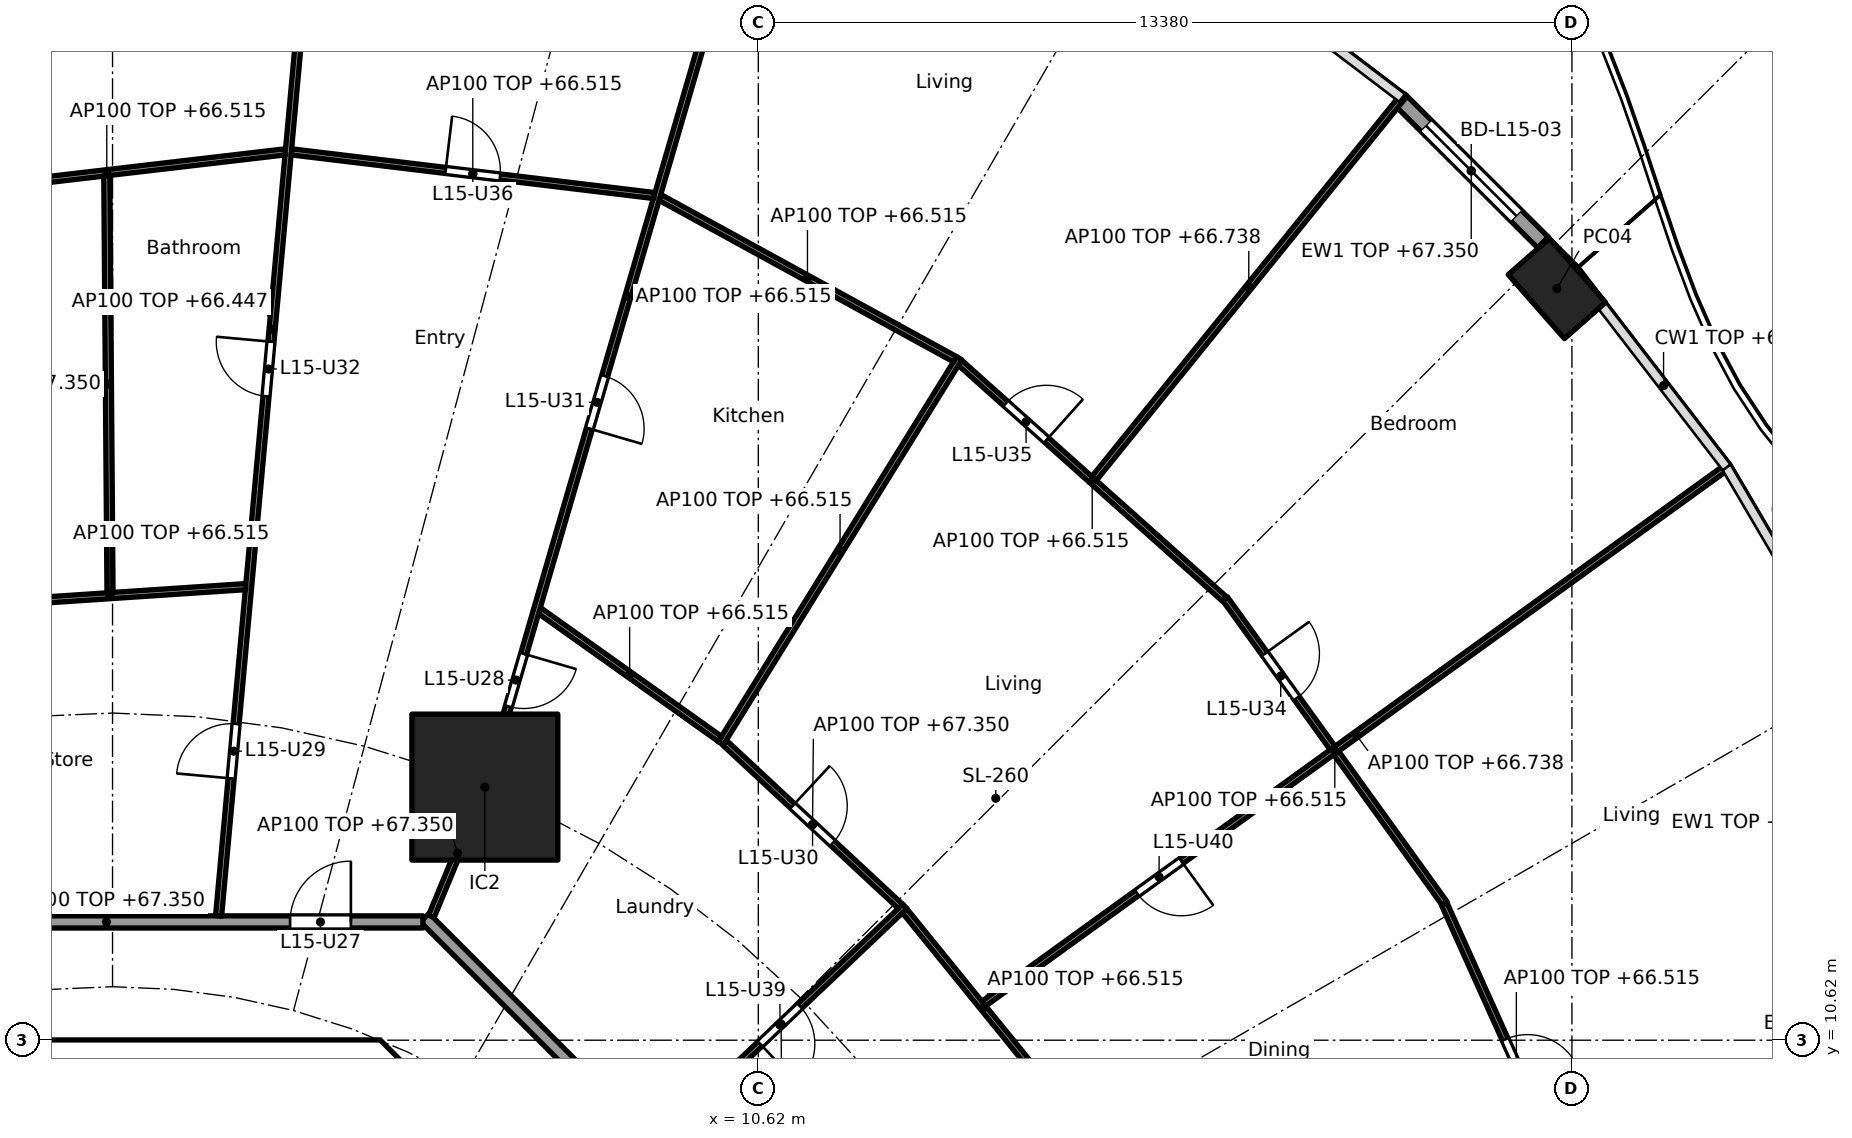
"""IFC4 building model, lengths in metres.
Left out: names, types, materials, properties, quantities, classifications, styles, units other than length and angle.
Written with IfcOpenShell. Run it as: python <this file> out.ifc"""

import sys

from ifc_helpers import new_model, si_unit, direction, frame, frame_2d, origin, origin_2d, place, context, subcontext, project, spatial, polyline, rectangle, hollow_rectangle, outline, extrude, element, fill, save


model = new_model("IFC4")
c1 = context("Model", 3, precision=1e-05, world=origin(), true_north=direction((0.0, 1.0)))
c2 = subcontext(c1, "Body", "Model", "MODEL_VIEW")
j1 = project(units=[si_unit("LENGTHUNIT", "METRE"), si_unit("PLANEANGLEUNIT", "RADIAN")], contexts=[c1])
p1 = place(None, origin())
s1 = spatial("IfcSite", under=j1, at=p1, CompositionType="ELEMENT")
p2 = place(p1, origin())
s2 = spatial("IfcBuilding", under=s1, at=p2, CompositionType="ELEMENT")
p3 = place(p2, frame((0.0, 0.0, 64.0)))
s3 = spatial("IfcBuildingStorey", under=s2, at=p3, CompositionType="ELEMENT", Elevation=64.0)
p4 = place(p3, frame((23.752, 22.981, 0.0), z_axis=(0.0, 0.0, 1.0), x_axis=(-0.660114607735, 0.751164898445, 0.0)))
e1 = element("IfcColumn", 1, at=p4, inside=s3, PredefinedType="COLUMN", context=c2, shape_type="SweptSolid", body=[
    extrude(hollow_rectangle(XDim=1.4, YDim=0.9, WallThickness=0.05, at=origin_2d()), origin(), (0.0, 0.0, 1.0), 3.7),
])
p5 = place(p3, frame((6.123, 14.782, 0.0), z_axis=(0.0, 0.0, 1.0), x_axis=(1.0, 0.0, 0.0)))
e2 = element("IfcColumn", 2, at=p5, inside=s3, PredefinedType="COLUMN", context=c2, shape_type="SweptSolid", body=[
    extrude(rectangle(XDim=2.4, YDim=2.4, at=origin_2d()), origin(), (0.0, 0.0, 1.0), 3.7),
])
p6 = place(p3, frame((21.166, 26.092, 0.0), z_axis=(0.0, 0.0, 1.0), x_axis=(0.707803094595, -0.706409781417, 0.0)))
e3 = element("IfcWall", 3, at=p6, inside=s3, PredefinedType="SOLIDWALL", context=c2, shape_type="SweptSolid", body=[
    extrude(rectangle(XDim=3.329, YDim=0.25, at=frame_2d((1.665, 0.0))), origin(), (0.0, 0.0, 1.0), 3.35),
])
p7 = place(p6, frame((0.615, 0.0, 0.0)))
e4 = element("IfcOpeningElement", 4, at=p7, cuts=e3, PredefinedType="OPENING", context=c2, shape_type="SweptSolid", body=[
    extrude(rectangle(XDim=2.1, YDim=2.4, at=frame_2d((1.05, 1.2))), frame((0.0, 0.135, 0.0), z_axis=(0.0, -1.0, 0.0), x_axis=(1.0, 0.0, 0.0)), (0.0, 0.0, 1.0), 0.27),
])
p8 = place(p3, origin())
e5 = element("IfcWall", 5, at=p8, inside=s3, PredefinedType="SHEAR", context=c2, shape_type="SweptSolid", body=[
    extrude(outline(polyline([(-4.152, 10.025), (-4.401, 9.776), (-4.825, 10.2), (-4.401, 10.625), (4.401, 10.625), (4.825, 10.2), (4.401, 9.776), (4.152, 10.025), (-4.152, 10.025)])), origin(), (0.0, 0.0, 1.0), 3.35),
])
p9 = place(p3, frame((12.635, 5.134, 0.0), z_axis=(0.0, 0.0, 1.0), x_axis=(-0.707106781187, 0.707106781187, 0.0)))
e6 = element("IfcWall", 6, at=p9, inside=s3, PredefinedType="PARTITIONING", context=c2, shape_type="SweptSolid", body=[
    extrude(rectangle(XDim=10.609, YDim=0.2, at=frame_2d((5.305, 0.0))), origin(), (0.0, 0.0, 1.0), 3.35),
])
p10 = place(p3, frame((5.104, 12.565, 0.0), z_axis=(0.0, 0.0, 1.0), x_axis=(-1.0, 0.0, 0.0)))
e7 = element("IfcWall", 7, at=p10, inside=s3, PredefinedType="PARTITIONING", context=c2, shape_type="SweptSolid", body=[
    extrude(rectangle(XDim=10.409, YDim=0.2, at=frame_2d((5.205, 0.0))), origin(), (0.0, 0.0, 1.0), 3.35),
])
p11 = place(p10, frame((1.185, 0.0, 0.0)))
e8 = element("IfcOpeningElement", 8, at=p11, cuts=e7, PredefinedType="OPENING", context=c2, shape_type="SweptSolid", body=[
    extrude(rectangle(XDim=1.0, YDim=2.1, at=frame_2d((0.5, 1.05))), frame((0.0, 0.11, 0.0), z_axis=(0.0, -1.0, 0.0), x_axis=(1.0, 0.0, 0.0)), (0.0, 0.0, 1.0), 0.22),
])
p12 = place(p3, frame((24.273, 7.584, 0.0), z_axis=(0.0, 0.0, 1.0), x_axis=(-0.410201529109, 0.911994904326, 0.0)))
e9 = element("IfcWall", 9, at=p12, inside=s3, PredefinedType="PARTITIONING", context=c2, shape_type="SweptSolid", body=[
    extrude(rectangle(XDim=5.787, YDim=0.1, at=frame_2d((2.894, 0.0))), origin(), (0.0, 0.0, 1.0), 2.515),
])
p13 = place(p12, frame((2.444, 0.0, 0.0)))
e10 = element("IfcOpeningElement", 10, at=p13, cuts=e9, PredefinedType="OPENING", context=c2, shape_type="SweptSolid", body=[
    extrude(rectangle(XDim=0.9, YDim=2.1, at=frame_2d((0.45, 1.05))), frame((0.0, 0.06, 0.0), z_axis=(0.0, -1.0, 0.0), x_axis=(1.0, 0.0, 0.0)), (0.0, 0.0, 1.0), 0.12),
])
p14 = place(p3, frame((15.614, 9.559, 0.0), z_axis=(0.0, 0.0, 1.0), x_axis=(-0.63012473344, 0.776493928056, 0.0)))
e11 = element("IfcWall", 11, at=p14, inside=s3, PredefinedType="PARTITIONING", context=c2, shape_type="SweptSolid", body=[
    extrude(rectangle(XDim=4.106, YDim=0.1, at=frame_2d((2.053, 0.0))), origin(), (0.0, 0.0, 1.0), 2.515),
])
p15 = place(p3, frame((21.908, 12.866, 0.0), z_axis=(0.0, 0.0, 1.0), x_axis=(-0.584553256988, 0.811355341231, 0.0)))
e12 = element("IfcWall", 12, at=p15, inside=s3, PredefinedType="PARTITIONING", context=c2, shape_type="SweptSolid", body=[
    extrude(rectangle(XDim=6.184, YDim=0.1, at=frame_2d((3.092, 0.0))), origin(), (0.0, 0.0, 1.0), 2.515),
])
p16 = place(p15, frame((4.163, 0.0, 0.0)))
e13 = element("IfcOpeningElement", 13, at=p16, cuts=e12, PredefinedType="OPENING", context=c2, shape_type="SweptSolid", body=[
    extrude(rectangle(XDim=0.9, YDim=2.1, at=frame_2d((0.45, 1.05))), frame((0.0, 0.06, 0.0), z_axis=(0.0, -1.0, 0.0), x_axis=(1.0, 0.0, 0.0)), (0.0, 0.0, 1.0), 0.12),
])
p17 = place(p3, frame((14.329, 11.221, 0.0), z_axis=(0.0, 0.0, 1.0), x_axis=(0.810671130917, 0.58550176558, 0.0)))
e14 = element("IfcWall", 14, at=p17, inside=s3, PredefinedType="PARTITIONING", context=c2, shape_type="SweptSolid", body=[
    extrude(rectangle(XDim=15.106, YDim=0.1, at=frame_2d((7.553, 0.0))), origin(), (0.0, 0.0, 1.0), 2.738),
])
p18 = place(p17, frame((3.105, 0.0, 0.0)))
e15 = element("IfcOpeningElement", 15, at=p18, cuts=e14, PredefinedType="OPENING", context=c2, shape_type="SweptSolid", body=[
    extrude(rectangle(XDim=0.9, YDim=2.1, at=frame_2d((0.45, 1.05))), frame((0.0, 0.06, 0.0), z_axis=(0.0, -1.0, 0.0), x_axis=(1.0, 0.0, 0.0)), (0.0, 0.0, 1.0), 0.12),
])
p19 = place(p3, frame((8.957, 8.953, 0.0), z_axis=(0.0, 0.0, 1.0), x_axis=(0.725253319157, 0.688482115273, 0.0)))
e16 = element("IfcWall", 16, at=p19, inside=s3, PredefinedType="PARTITIONING", context=c2, shape_type="SweptSolid", body=[
    extrude(rectangle(XDim=5.617, YDim=0.1, at=frame_2d((2.809, 0.0))), origin(), (0.0, 0.0, 1.0), 2.447),
])
p20 = place(p19, frame((2.333, 0.0, 0.0)))
e17 = element("IfcOpeningElement", 17, at=p20, cuts=e16, PredefinedType="OPENING", context=c2, shape_type="SweptSolid", body=[
    extrude(rectangle(XDim=0.9, YDim=2.1, at=frame_2d((0.45, 1.05))), frame((0.0, 0.06, 0.0), z_axis=(0.0, -1.0, 0.0), x_axis=(1.0, 0.0, 0.0)), (0.0, 0.0, 1.0), 0.12),
])
p21 = place(p3, frame((12.958, 12.82, 0.0), z_axis=(0.0, 0.0, 1.0), x_axis=(-0.732022571638, 0.681280378855, 0.0)))
e18 = element("IfcWall", 18, at=p21, inside=s3, PredefinedType="PARTITIONING", context=c2, shape_type="SweptSolid", body=[
    extrude(rectangle(XDim=3.95, YDim=0.1, at=frame_2d((1.975, 0.0))), origin(), (0.0, 0.0, 1.0), 3.35),
])
p22 = place(p21, frame((1.525, 0.0, 0.0)))
e19 = element("IfcOpeningElement", 19, at=p22, cuts=e18, PredefinedType="OPENING", context=c2, shape_type="SweptSolid", body=[
    extrude(rectangle(XDim=0.9, YDim=2.1, at=frame_2d((0.45, 1.05))), frame((0.0, 0.06, 0.0), z_axis=(0.0, -1.0, 0.0), x_axis=(1.0, 0.0, 0.0)), (0.0, 0.0, 1.0), 0.12),
])
p23 = place(p3, frame((18.285, 17.877, 0.0), z_axis=(0.0, 0.0, 1.0), x_axis=(-0.745806142791, 0.666163041136, 0.0)))
e20 = element("IfcWall", 20, at=p23, inside=s3, PredefinedType="PARTITIONING", context=c2, shape_type="SweptSolid", body=[
    extrude(rectangle(XDim=5.831, YDim=0.1, at=frame_2d((2.915, 0.0))), origin(), (0.0, 0.0, 1.0), 2.515),
])
p24 = place(p23, frame((3.923, 0.0, 0.0)))
e21 = element("IfcOpeningElement", 21, at=p24, cuts=e20, PredefinedType="OPENING", context=c2, shape_type="SweptSolid", body=[
    extrude(rectangle(XDim=0.9, YDim=2.1, at=frame_2d((0.45, 1.05))), frame((0.0, 0.06, 0.0), z_axis=(0.0, -1.0, 0.0), x_axis=(1.0, 0.0, 0.0)), (0.0, 0.0, 1.0), 0.12),
])
p25 = place(p3, frame((16.142, 19.858, 0.0), z_axis=(0.0, 0.0, 1.0), x_axis=(0.628738066508, 0.777617157555, 0.0)))
e22 = element("IfcWall", 22, at=p25, inside=s3, PredefinedType="PARTITIONING", context=c2, shape_type="SweptSolid", body=[
    extrude(rectangle(XDim=8.091, YDim=0.1, at=frame_2d((4.045, 0.0))), origin(), (0.0, 0.0, 1.0), 2.738),
])
p26 = place(p3, frame((10.003, 15.503, 0.0), z_axis=(0.0, 0.0, 1.0), x_axis=(0.52645953022, 0.850200189979, 0.0)))
e23 = element("IfcWall", 23, at=p26, inside=s3, PredefinedType="PARTITIONING", context=c2, shape_type="SweptSolid", body=[
    extrude(rectangle(XDim=7.45, YDim=0.1, at=frame_2d((3.725, 0.0))), origin(), (0.0, 0.0, 1.0), 2.515),
])
p27 = place(p3, frame((9.989, 15.574, 0.0), z_axis=(0.0, 0.0, 1.0), x_axis=(-0.81494477814, 0.57953861699, 0.0)))
e24 = element("IfcWall", 24, at=p27, inside=s3, PredefinedType="PARTITIONING", context=c2, shape_type="SweptSolid", body=[
    extrude(rectangle(XDim=3.644, YDim=0.1, at=frame_2d((1.822, 0.0))), origin(), (0.0, 0.0, 1.0), 2.515),
])
p28 = place(p3, frame((13.855, 21.818, 0.0), z_axis=(0.0, 0.0, 1.0), x_axis=(-0.876794415294, 0.480865421203, 0.0)))
e25 = element("IfcWall", 25, at=p28, inside=s3, PredefinedType="PARTITIONING", context=c2, shape_type="SweptSolid", body=[
    extrude(rectangle(XDim=5.536, YDim=0.1, at=frame_2d((2.768, 0.0))), origin(), (0.0, 0.0, 1.0), 2.515),
])
p29 = place(p3, frame((5.243, 12.657, 0.0), z_axis=(0.0, 0.0, 1.0), x_axis=(0.382719158442, 0.923864733477, 0.0)))
e26 = element("IfcWall", 26, at=p29, inside=s3, PredefinedType="PARTITIONING", context=c2, shape_type="SweptSolid", body=[
    extrude(rectangle(XDim=2.25, YDim=0.1, at=frame_2d((1.125, 0.0))), origin(), (0.0, 0.0, 1.0), 3.35),
])
p30 = place(p3, frame((6.137, 14.83, 0.0), z_axis=(0.0, 0.0, 1.0), x_axis=(0.27985745069, 0.960041565399, 0.0)))
e27 = element("IfcWall", 27, at=p30, inside=s3, PredefinedType="PARTITIONING", context=c2, shape_type="SweptSolid", body=[
    extrude(rectangle(XDim=16.705, YDim=0.1, at=frame_2d((8.353, 0.0))), origin(), (0.0, 0.0, 1.0), 2.515),
])
p31 = place(p30, frame((1.334, 0.0, 0.0)))
e28 = element("IfcOpeningElement", 28, at=p31, cuts=e27, PredefinedType="OPENING", context=c2, shape_type="SweptSolid", body=[
    extrude(rectangle(XDim=0.9, YDim=2.1, at=frame_2d((0.45, 1.05))), frame((0.0, 0.06, 0.0), z_axis=(0.0, -1.0, 0.0), x_axis=(1.0, 0.0, 0.0)), (0.0, 0.0, 1.0), 0.12),
])
p32 = place(p30, frame((6.091, 0.0, 0.0)))
e29 = element("IfcOpeningElement", 29, at=p32, cuts=e27, PredefinedType="OPENING", context=c2, shape_type="SweptSolid", body=[
    extrude(rectangle(XDim=0.9, YDim=2.1, at=frame_2d((0.45, 1.05))), frame((0.0, 0.06, 0.0), z_axis=(0.0, -1.0, 0.0), x_axis=(1.0, 0.0, 0.0)), (0.0, 0.0, 1.0), 0.12),
])
p33 = place(p3, frame((8.907, 24.51, 0.0), z_axis=(0.0, 0.0, 1.0), x_axis=(-0.992836798252, 0.119478416615, 0.0)))
e30 = element("IfcWall", 30, at=p33, inside=s3, PredefinedType="PARTITIONING", context=c2, shape_type="SweptSolid", body=[
    extrude(rectangle(XDim=6.01, YDim=0.1, at=frame_2d((3.005, 0.0))), origin(), (0.0, 0.0, 1.0), 2.515),
])
p34 = place(p33, frame((2.555, 0.0, 0.0)))
e31 = element("IfcOpeningElement", 31, at=p34, cuts=e30, PredefinedType="OPENING", context=c2, shape_type="SweptSolid", body=[
    extrude(rectangle(XDim=0.9, YDim=2.1, at=frame_2d((0.45, 1.05))), frame((0.0, 0.06, 0.0), z_axis=(0.0, -1.0, 0.0), x_axis=(1.0, 0.0, 0.0)), (0.0, 0.0, 1.0), 0.12),
])
p35 = place(p3, frame((1.744, 12.664, 0.0), z_axis=(0.0, 0.0, 1.0), x_axis=(0.090893639596, 0.995860605849, 0.0)))
e32 = element("IfcWall", 32, at=p35, inside=s3, PredefinedType="PARTITIONING", context=c2, shape_type="SweptSolid", body=[
    extrude(rectangle(XDim=19.374, YDim=0.1, at=frame_2d((9.687, 0.0))), origin(), (0.0, 0.0, 1.0), 2.447),
])
p36 = place(p35, frame((2.27, 0.0, 0.0)))
e33 = element("IfcOpeningElement", 33, at=p36, cuts=e32, PredefinedType="OPENING", context=c2, shape_type="SweptSolid", body=[
    extrude(rectangle(XDim=0.9, YDim=2.1, at=frame_2d((0.45, 1.05))), frame((0.0, 0.06, 0.0), z_axis=(0.0, -1.0, 0.0), x_axis=(1.0, 0.0, 0.0)), (0.0, 0.0, 1.0), 0.12),
])
p37 = place(p35, frame((8.582, 0.0, 0.0)))
e34 = element("IfcOpeningElement", 34, at=p37, cuts=e32, PredefinedType="OPENING", context=c2, shape_type="SweptSolid", body=[
    extrude(rectangle(XDim=0.9, YDim=2.1, at=frame_2d((0.45, 1.05))), frame((0.0, 0.06, 0.0), z_axis=(0.0, -1.0, 0.0), x_axis=(1.0, 0.0, 0.0)), (0.0, 0.0, 1.0), 0.12),
])
p38 = place(p35, frame((15.548, 0.0, 0.0)))
e35 = element("IfcOpeningElement", 35, at=p38, cuts=e32, PredefinedType="OPENING", context=c2, shape_type="SweptSolid", body=[
    extrude(rectangle(XDim=0.9, YDim=2.1, at=frame_2d((0.45, 1.05))), frame((0.0, 0.06, 0.0), z_axis=(0.0, -1.0, 0.0), x_axis=(1.0, 0.0, 0.0)), (0.0, 0.0, 1.0), 0.12),
])
p39 = place(p3, frame((2.188, 18.079, 0.0), z_axis=(0.0, 0.0, 1.0), x_axis=(-0.997791437766, -0.066424744789, 0.0)))
e36 = element("IfcWall", 36, at=p39, inside=s3, PredefinedType="PARTITIONING", context=c2, shape_type="SweptSolid", body=[
    extrude(rectangle(XDim=4.469, YDim=0.1, at=frame_2d((2.235, 0.0))), origin(), (0.0, 0.0, 1.0), 2.515),
])
p40 = place(p3, frame((2.842, 25.229, 0.0), z_axis=(0.0, 0.0, 1.0), x_axis=(-0.993255612046, -0.115945198862, 0.0)))
e37 = element("IfcWall", 37, at=p40, inside=s3, PredefinedType="PARTITIONING", context=c2, shape_type="SweptSolid", body=[
    extrude(rectangle(XDim=5.913, YDim=0.1, at=frame_2d((2.956, 0.0))), origin(), (0.0, 0.0, 1.0), 2.515),
])
p41 = place(p3, frame((-0.042, 17.98, 0.0), z_axis=(0.0, 0.0, 1.0), x_axis=(-0.007692080119, 0.999970415514, 0.0)))
e38 = element("IfcWall", 38, at=p41, inside=s3, PredefinedType="PARTITIONING", context=c2, shape_type="SweptSolid", body=[
    extrude(rectangle(XDim=6.856, YDim=0.1, at=frame_2d((3.428, 0.0))), origin(), (0.0, 0.0, 1.0), 3.35),
])
p42 = place(p7, origin())
e39 = element("IfcDoor", 39, at=p42, inside=s3, OperationType="SLIDING_TO_LEFT", PredefinedType="DOOR", context=c2, shape_type="SweptSolid", body=[
    extrude(rectangle(XDim=2.1, YDim=2.4, at=frame_2d((1.05, 1.2))), frame((0.0, 0.025, 0.0), z_axis=(0.0, -1.0, 0.0), x_axis=(1.0, 0.0, 0.0)), (0.0, 0.0, 1.0), 0.05),
])
fill(e4, e39)
p43 = place(p11, frame((1.0, 0.0, 0.0), x_axis=(-1.0, 0.0, 0.0)))
e40 = element("IfcDoor", 40, at=p43, inside=s3, OperationType="SINGLE_SWING_RIGHT", PredefinedType="DOOR", context=c2, shape_type="SweptSolid", body=[
    extrude(rectangle(XDim=1.0, YDim=2.1, at=frame_2d((0.5, 1.05))), frame((0.0, 0.025, 0.0), z_axis=(0.0, -1.0, 0.0), x_axis=(1.0, 0.0, 0.0)), (0.0, 0.0, 1.0), 0.05),
])
fill(e8, e40)
p44 = place(p31, frame((0.9, 0.0, 0.0), x_axis=(-1.0, 0.0, 0.0)))
e41 = element("IfcDoor", 41, at=p44, inside=s3, OperationType="SINGLE_SWING_LEFT", PredefinedType="DOOR", context=c2, shape_type="SweptSolid", body=[
    extrude(rectangle(XDim=0.9, YDim=2.1, at=frame_2d((0.45, 1.05))), frame((0.0, 0.025, 0.0), z_axis=(0.0, -1.0, 0.0), x_axis=(1.0, 0.0, 0.0)), (0.0, 0.0, 1.0), 0.05),
])
fill(e28, e41)
p45 = place(p36, origin())
e42 = element("IfcDoor", 42, at=p45, inside=s3, OperationType="SINGLE_SWING_LEFT", PredefinedType="DOOR", context=c2, shape_type="SweptSolid", body=[
    extrude(rectangle(XDim=0.9, YDim=2.1, at=frame_2d((0.45, 1.05))), frame((0.0, 0.025, 0.0), z_axis=(0.0, -1.0, 0.0), x_axis=(1.0, 0.0, 0.0)), (0.0, 0.0, 1.0), 0.05),
])
fill(e33, e42)
p46 = place(p22, frame((0.9, 0.0, 0.0), x_axis=(-1.0, 0.0, 0.0)))
e43 = element("IfcDoor", 43, at=p46, inside=s3, OperationType="SINGLE_SWING_LEFT", PredefinedType="DOOR", context=c2, shape_type="SweptSolid", body=[
    extrude(rectangle(XDim=0.9, YDim=2.1, at=frame_2d((0.45, 1.05))), frame((0.0, 0.025, 0.0), z_axis=(0.0, -1.0, 0.0), x_axis=(1.0, 0.0, 0.0)), (0.0, 0.0, 1.0), 0.05),
])
fill(e19, e43)
p47 = place(p32, frame((0.9, 0.0, 0.0), x_axis=(-1.0, 0.0, 0.0)))
e44 = element("IfcDoor", 44, at=p47, inside=s3, OperationType="SINGLE_SWING_RIGHT", PredefinedType="DOOR", context=c2, shape_type="SweptSolid", body=[
    extrude(rectangle(XDim=0.9, YDim=2.1, at=frame_2d((0.45, 1.05))), frame((0.0, 0.025, 0.0), z_axis=(0.0, -1.0, 0.0), x_axis=(1.0, 0.0, 0.0)), (0.0, 0.0, 1.0), 0.05),
])
fill(e29, e44)
p48 = place(p37, origin())
e45 = element("IfcDoor", 45, at=p48, inside=s3, OperationType="SINGLE_SWING_RIGHT", PredefinedType="DOOR", context=c2, shape_type="SweptSolid", body=[
    extrude(rectangle(XDim=0.9, YDim=2.1, at=frame_2d((0.45, 1.05))), frame((0.0, 0.025, 0.0), z_axis=(0.0, -1.0, 0.0), x_axis=(1.0, 0.0, 0.0)), (0.0, 0.0, 1.0), 0.05),
])
fill(e34, e45)
p49 = place(p16, frame((0.9, 0.0, 0.0), x_axis=(-1.0, 0.0, 0.0)))
e46 = element("IfcDoor", 46, at=p49, inside=s3, OperationType="SINGLE_SWING_LEFT", PredefinedType="DOOR", context=c2, shape_type="SweptSolid", body=[
    extrude(rectangle(XDim=0.9, YDim=2.1, at=frame_2d((0.45, 1.05))), frame((0.0, 0.025, 0.0), z_axis=(0.0, -1.0, 0.0), x_axis=(1.0, 0.0, 0.0)), (0.0, 0.0, 1.0), 0.05),
])
fill(e13, e46)
p50 = place(p24, frame((0.9, 0.0, 0.0), x_axis=(-1.0, 0.0, 0.0)))
e47 = element("IfcDoor", 47, at=p50, inside=s3, OperationType="SINGLE_SWING_RIGHT", PredefinedType="DOOR", context=c2, shape_type="SweptSolid", body=[
    extrude(rectangle(XDim=0.9, YDim=2.1, at=frame_2d((0.45, 1.05))), frame((0.0, 0.025, 0.0), z_axis=(0.0, -1.0, 0.0), x_axis=(1.0, 0.0, 0.0)), (0.0, 0.0, 1.0), 0.05),
])
fill(e21, e47)
p51 = place(p34, frame((0.9, 0.0, 0.0), x_axis=(-1.0, 0.0, 0.0)))
e48 = element("IfcDoor", 48, at=p51, inside=s3, OperationType="SINGLE_SWING_LEFT", PredefinedType="DOOR", context=c2, shape_type="SweptSolid", body=[
    extrude(rectangle(XDim=0.9, YDim=2.1, at=frame_2d((0.45, 1.05))), frame((0.0, 0.025, 0.0), z_axis=(0.0, -1.0, 0.0), x_axis=(1.0, 0.0, 0.0)), (0.0, 0.0, 1.0), 0.05),
])
fill(e31, e48)
p52 = place(p20, frame((0.9, 0.0, 0.0), x_axis=(-1.0, 0.0, 0.0)))
e49 = element("IfcDoor", 49, at=p52, inside=s3, OperationType="SINGLE_SWING_RIGHT", PredefinedType="DOOR", context=c2, shape_type="SweptSolid", body=[
    extrude(rectangle(XDim=0.9, YDim=2.1, at=frame_2d((0.45, 1.05))), frame((0.0, 0.025, 0.0), z_axis=(0.0, -1.0, 0.0), x_axis=(1.0, 0.0, 0.0)), (0.0, 0.0, 1.0), 0.05),
])
fill(e17, e49)
p53 = place(p18, frame((0.9, 0.0, 0.0), x_axis=(-1.0, 0.0, 0.0)))
e50 = element("IfcDoor", 50, at=p53, inside=s3, OperationType="SINGLE_SWING_LEFT", PredefinedType="DOOR", context=c2, shape_type="SweptSolid", body=[
    extrude(rectangle(XDim=0.9, YDim=2.1, at=frame_2d((0.45, 1.05))), frame((0.0, 0.025, 0.0), z_axis=(0.0, -1.0, 0.0), x_axis=(1.0, 0.0, 0.0)), (0.0, 0.0, 1.0), 0.05),
])
fill(e15, e50)
p54 = place(p13, frame((0.9, 0.0, 0.0), x_axis=(-1.0, 0.0, 0.0)))
e51 = element("IfcDoor", 51, at=p54, inside=s3, OperationType="SINGLE_SWING_RIGHT", PredefinedType="DOOR", context=c2, shape_type="SweptSolid", body=[
    extrude(rectangle(XDim=0.9, YDim=2.1, at=frame_2d((0.45, 1.05))), frame((0.0, 0.025, 0.0), z_axis=(0.0, -1.0, 0.0), x_axis=(1.0, 0.0, 0.0)), (0.0, 0.0, 1.0), 0.05),
])
fill(e10, e51)
save(model, sys.argv[1])
